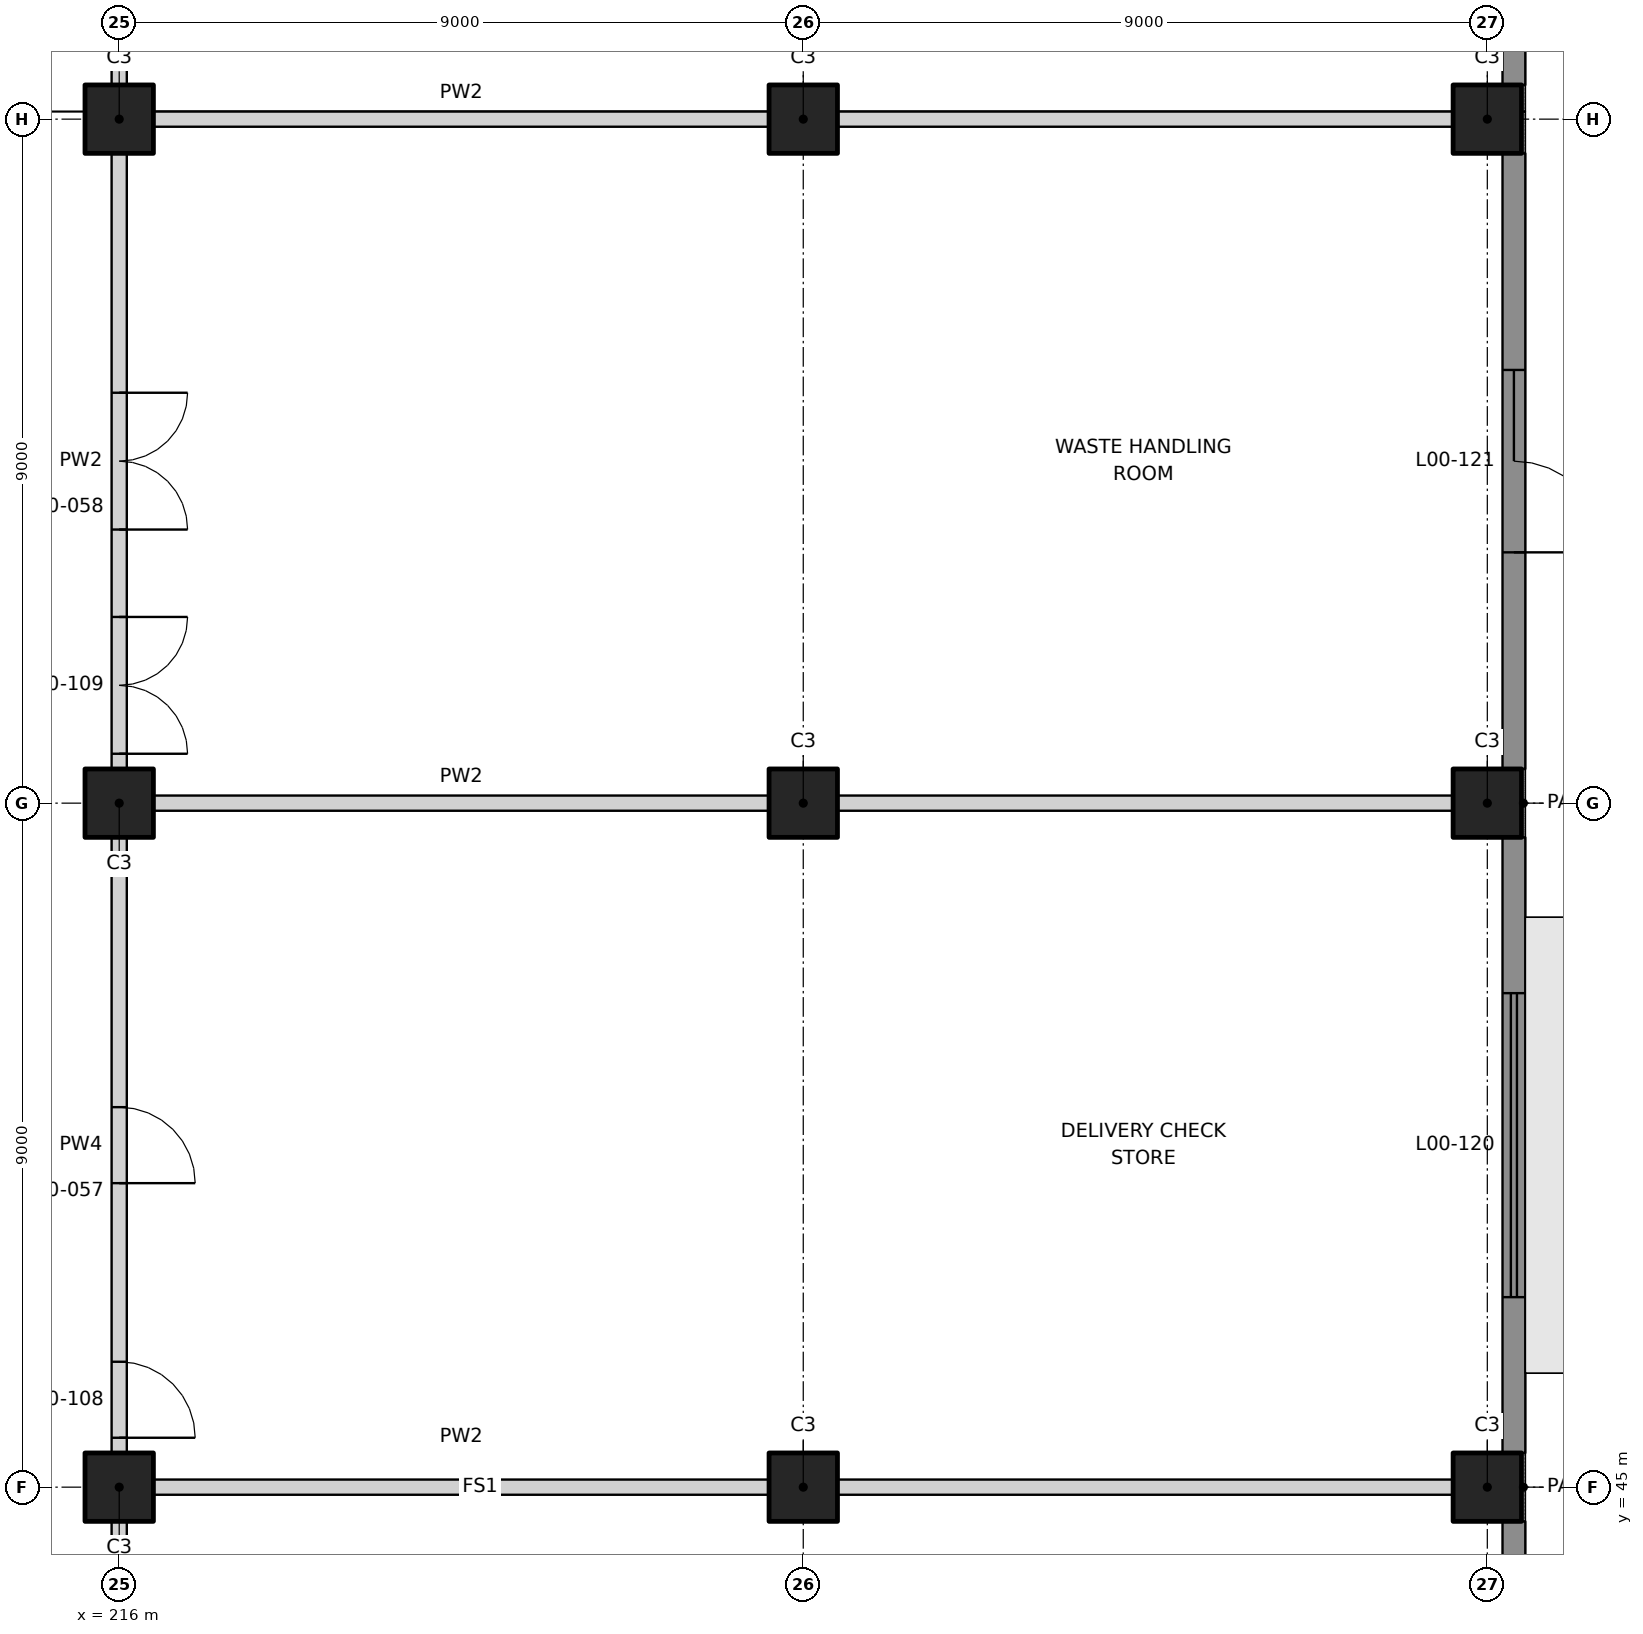
"""IFC4 building model, lengths in metres.
Left out: names, types, materials, properties, quantities, classifications, styles, units other than length and angle.
Written with IfcOpenShell. Run it as: python <this file> out.ifc"""

import sys

from ifc_helpers import new_model, si_unit, direction, frame, frame_2d, origin, origin_2d, place, context, subcontext, project, spatial, rectangle, extrude, element, fill, save


model = new_model("IFC4")
c1 = context("Model", 3, precision=1e-05, world=origin(), true_north=direction((0.0, 1.0)))
c2 = subcontext(c1, "Body", "Model", "MODEL_VIEW")
j1 = project(units=[si_unit("LENGTHUNIT", "METRE"), si_unit("PLANEANGLEUNIT", "RADIAN")], contexts=[c1])
p1 = place(None, origin())
s1 = spatial("IfcSite", under=j1, at=p1, CompositionType="ELEMENT")
p2 = place(p1, origin())
s2 = spatial("IfcBuilding", under=s1, at=p2, CompositionType="ELEMENT")
p3 = place(p2, origin())
s3 = spatial("IfcBuildingStorey", under=s2, at=p3, CompositionType="ELEMENT", Elevation=0.0)
for number, where, z_axis, x_axis in (
    (1, (216.0, 45.0, 0.0), (0.0, 0.0, 1.0), (1.0, 0.0, 0.0)),
    (2, (216.0, 54.0, 0.0), (0.0, 0.0, 1.0), (1.0, 0.0, 0.0)),
    (3, (216.0, 63.0, 0.0), (0.0, 0.0, 1.0), (1.0, 0.0, 0.0)),
    (4, (225.0, 45.0, 0.0), (0.0, 0.0, 1.0), (1.0, 0.0, 0.0)),
    (5, (225.0, 54.0, 0.0), (0.0, 0.0, 1.0), (1.0, 0.0, 0.0)),
    (6, (225.0, 63.0, 0.0), (0.0, 0.0, 1.0), (1.0, 0.0, 0.0)),
    (7, (234.0, 45.0, 0.0), (0.0, 0.0, 1.0), (1.0, 0.0, 0.0)),
    (8, (234.0, 54.0, 0.0), (0.0, 0.0, 1.0), (1.0, 0.0, 0.0)),
    (9, (234.0, 63.0, 0.0), (0.0, 0.0, 1.0), (1.0, 0.0, 0.0)),
):
    element("IfcColumn", number, at=place(p3, frame(where, z_axis=z_axis, x_axis=x_axis)), inside=s3, PredefinedType="COLUMN", context=c2, shape_type="SweptSolid", body=[
        extrude(rectangle(XDim=0.9, YDim=0.9, at=origin_2d()), origin(), (0.0, 0.0, 1.0), 7.0),
    ])
for number, where, z_axis, x_axis in (
    (10, (225.45, 45.0, 0.0), (0.0, 0.0, 1.0), (1.0, 0.0, 0.0)),
    (11, (216.45, 45.0, 0.0), (0.0, 0.0, 1.0), (1.0, 0.0, 0.0)),
    (12, (225.45, 54.0, 0.0), (0.0, 0.0, 1.0), (1.0, 0.0, 0.0)),
    (13, (216.45, 54.0, 0.0), (0.0, 0.0, 1.0), (1.0, 0.0, 0.0)),
    (14, (225.45, 63.0, 0.0), (0.0, 0.0, 1.0), (1.0, 0.0, 0.0)),
    (15, (216.45, 63.0, 0.0), (0.0, 0.0, 1.0), (1.0, 0.0, 0.0)),
    (16, (216.0, 36.45, 0.0), (0.0, 0.0, 1.0), (0.0, 1.0, 0.0)),
):
    element("IfcWall", number, at=place(p3, frame(where, z_axis=z_axis, x_axis=x_axis)), inside=s3, PredefinedType="PARTITIONING", context=c2, shape_type="SweptSolid", body=[
        extrude(rectangle(XDim=8.1, YDim=0.2, at=frame_2d((4.05, 0.0))), origin(), (0.0, 0.0, 1.0), 5.75),
    ])
p4 = place(p3, frame((216.0, 45.45, 0.0), z_axis=(0.0, 0.0, 1.0), x_axis=(0.0, 1.0, 0.0)))
e17 = element("IfcWall", 17, at=p4, inside=s3, PredefinedType="PARTITIONING", context=c2, shape_type="SweptSolid", body=[
    extrude(rectangle(XDim=8.1, YDim=0.2, at=frame_2d((4.05, 0.0))), origin(), (0.0, 0.0, 1.0), 5.75),
])
p5 = place(p4, frame((3.55, 0.0, 0.0)))
e18 = element("IfcOpeningElement", 18, at=p5, cuts=e17, PredefinedType="OPENING", context=c2, shape_type="SweptSolid", body=[
    extrude(rectangle(XDim=1.0, YDim=2.1, at=frame_2d((0.5, 1.05))), frame((0.0, 0.11, 0.0), z_axis=(0.0, -1.0, 0.0), x_axis=(1.0, 0.0, 0.0)), (0.0, 0.0, 1.0), 0.22),
])
p6 = place(p4, frame((0.2, 0.0, 0.0)))
e19 = element("IfcOpeningElement", 19, at=p6, cuts=e17, PredefinedType="OPENING", context=c2, shape_type="SweptSolid", body=[
    extrude(rectangle(XDim=1.0, YDim=2.1, at=frame_2d((0.5, 1.05))), frame((0.0, 0.11, 0.0), z_axis=(0.0, -1.0, 0.0), x_axis=(1.0, 0.0, 0.0)), (0.0, 0.0, 1.0), 0.22),
])
p7 = place(p3, frame((216.0, 54.45, 0.0), z_axis=(0.0, 0.0, 1.0), x_axis=(0.0, 1.0, 0.0)))
e20 = element("IfcWall", 20, at=p7, inside=s3, PredefinedType="PARTITIONING", context=c2, shape_type="SweptSolid", body=[
    extrude(rectangle(XDim=8.1, YDim=0.2, at=frame_2d((4.05, 0.0))), origin(), (0.0, 0.0, 1.0), 5.75),
])
p8 = place(p7, frame((3.15, 0.0, 0.0)))
e21 = element("IfcOpeningElement", 21, at=p8, cuts=e20, PredefinedType="OPENING", context=c2, shape_type="SweptSolid", body=[
    extrude(rectangle(XDim=1.8, YDim=2.1, at=frame_2d((0.9, 1.05))), frame((0.0, 0.11, 0.0), z_axis=(0.0, -1.0, 0.0), x_axis=(1.0, 0.0, 0.0)), (0.0, 0.0, 1.0), 0.22),
])
p9 = place(p7, frame((0.2, 0.0, 0.0)))
e22 = element("IfcOpeningElement", 22, at=p9, cuts=e20, PredefinedType="OPENING", context=c2, shape_type="SweptSolid", body=[
    extrude(rectangle(XDim=1.8, YDim=2.1, at=frame_2d((0.9, 1.05))), frame((0.0, 0.11, 0.0), z_axis=(0.0, -1.0, 0.0), x_axis=(1.0, 0.0, 0.0)), (0.0, 0.0, 1.0), 0.22),
])
p10 = place(p3, frame((216.0, 63.45, 0.0), z_axis=(0.0, 0.0, 1.0), x_axis=(0.0, 1.0, 0.0)))
e23 = element("IfcWall", 23, at=p10, inside=s3, PredefinedType="PARTITIONING", context=c2, shape_type="SweptSolid", body=[
    extrude(rectangle(XDim=2.45, YDim=0.2, at=frame_2d((1.225, 0.0))), origin(), (0.0, 0.0, 1.0), 5.65),
])
p11 = place(p3, frame((234.35, 36.0, 0.0), z_axis=(0.0, 0.0, 1.0), x_axis=(0.0, 1.0, 0.0)))
e24 = element("IfcWall", 24, at=p11, inside=s3, PredefinedType="SOLIDWALL", context=c2, shape_type="SweptSolid", body=[
    extrude(rectangle(XDim=8.55, YDim=0.3, at=frame_2d((4.275, 0.0))), origin(), (0.0, 0.0, 1.0), 7.0),
])
p12 = place(p11, frame((3.3, 0.0, 0.0)))
e25 = element("IfcOpeningElement", 25, at=p12, cuts=e24, PredefinedType="OPENING", context=c2, shape_type="SweptSolid", body=[
    extrude(rectangle(XDim=2.4, YDim=2.4, at=frame_2d((1.2, 1.2))), frame((0.0, 0.16, 0.0), z_axis=(0.0, -1.0, 0.0), x_axis=(1.0, 0.0, 0.0)), (0.0, 0.0, 1.0), 0.32),
])
p13 = place(p3, frame((234.35, 45.45, 0.0), z_axis=(0.0, 0.0, 1.0), x_axis=(0.0, 1.0, 0.0)))
e26 = element("IfcWall", 26, at=p13, inside=s3, PredefinedType="SOLIDWALL", context=c2, shape_type="SweptSolid", body=[
    extrude(rectangle(XDim=8.1, YDim=0.3, at=frame_2d((4.05, 0.0))), origin(), (0.0, 0.0, 1.0), 7.0),
])
p14 = place(p13, frame((2.05, 0.0, 0.0)))
e27 = element("IfcOpeningElement", 27, at=p14, cuts=e26, PredefinedType="OPENING", context=c2, shape_type="SweptSolid", body=[
    extrude(rectangle(XDim=4.0, YDim=4.5, at=frame_2d((2.0, 2.25))), frame((0.0, 0.16, 0.0), z_axis=(0.0, -1.0, 0.0), x_axis=(1.0, 0.0, 0.0)), (0.0, 0.0, 1.0), 0.32),
])
p15 = place(p3, frame((234.35, 54.45, 0.0), z_axis=(0.0, 0.0, 1.0), x_axis=(0.0, 1.0, 0.0)))
e28 = element("IfcWall", 28, at=p15, inside=s3, PredefinedType="SOLIDWALL", context=c2, shape_type="SweptSolid", body=[
    extrude(rectangle(XDim=8.1, YDim=0.3, at=frame_2d((4.05, 0.0))), origin(), (0.0, 0.0, 1.0), 7.0),
])
p16 = place(p15, frame((2.85, 0.0, 0.0)))
e29 = element("IfcOpeningElement", 29, at=p16, cuts=e28, PredefinedType="OPENING", context=c2, shape_type="SweptSolid", body=[
    extrude(rectangle(XDim=2.4, YDim=2.4, at=frame_2d((1.2, 1.2))), frame((0.0, 0.16, 0.0), z_axis=(0.0, -1.0, 0.0), x_axis=(1.0, 0.0, 0.0)), (0.0, 0.0, 1.0), 0.32),
])
p17 = place(p3, frame((234.35, 63.45, 0.0), z_axis=(0.0, 0.0, 1.0), x_axis=(0.0, 1.0, 0.0)))
e30 = element("IfcWall", 30, at=p17, inside=s3, PredefinedType="SOLIDWALL", context=c2, shape_type="SweptSolid", body=[
    extrude(rectangle(XDim=8.1, YDim=0.3, at=frame_2d((4.05, 0.0))), origin(), (0.0, 0.0, 1.0), 7.0),
])
p18 = place(p17, frame((2.05, 0.0, 0.0)))
e31 = element("IfcOpeningElement", 31, at=p18, cuts=e30, PredefinedType="OPENING", context=c2, shape_type="SweptSolid", body=[
    extrude(rectangle(XDim=4.0, YDim=4.5, at=frame_2d((2.0, 2.25))), frame((0.0, 0.16, 0.0), z_axis=(0.0, -1.0, 0.0), x_axis=(1.0, 0.0, 0.0)), (0.0, 0.0, 1.0), 0.32),
])
p19 = place(p5, frame((1.0, 0.0, 0.0), z_axis=(0.0, 0.0, 1.0), x_axis=(-1.0, 0.0, 0.0)))
e32 = element("IfcDoor", 32, at=p19, inside=s3, OperationType="SINGLE_SWING_RIGHT", PredefinedType="DOOR", context=c2, shape_type="SweptSolid", body=[
    extrude(rectangle(XDim=1.0, YDim=2.1, at=frame_2d((0.5, 1.05))), frame((0.0, 0.025, 0.0), z_axis=(0.0, -1.0, 0.0), x_axis=(1.0, 0.0, 0.0)), (0.0, 0.0, 1.0), 0.05),
])
fill(e18, e32)
p20 = place(p8, frame((1.8, 0.0, 0.0), z_axis=(0.0, 0.0, 1.0), x_axis=(-1.0, 0.0, 0.0)))
e33 = element("IfcDoor", 33, at=p20, inside=s3, OperationType="DOUBLE_DOOR_DOUBLE_SWING", PredefinedType="DOOR", context=c2, shape_type="SweptSolid", body=[
    extrude(rectangle(XDim=1.8, YDim=2.1, at=frame_2d((0.9, 1.05))), frame((0.0, 0.025, 0.0), z_axis=(0.0, -1.0, 0.0), x_axis=(1.0, 0.0, 0.0)), (0.0, 0.0, 1.0), 0.05),
])
fill(e21, e33)
p21 = place(p6, frame((1.0, 0.0, 0.0), z_axis=(0.0, 0.0, 1.0), x_axis=(-1.0, 0.0, 0.0)))
e34 = element("IfcDoor", 34, at=p21, inside=s3, OperationType="SINGLE_SWING_RIGHT", PredefinedType="DOOR", context=c2, shape_type="SweptSolid", body=[
    extrude(rectangle(XDim=1.0, YDim=2.1, at=frame_2d((0.5, 1.05))), frame((0.0, 0.025, 0.0), z_axis=(0.0, -1.0, 0.0), x_axis=(1.0, 0.0, 0.0)), (0.0, 0.0, 1.0), 0.05),
])
fill(e19, e34)
p22 = place(p9, frame((1.8, 0.0, 0.0), z_axis=(0.0, 0.0, 1.0), x_axis=(-1.0, 0.0, 0.0)))
e35 = element("IfcDoor", 35, at=p22, inside=s3, OperationType="DOUBLE_DOOR_DOUBLE_SWING", PredefinedType="DOOR", context=c2, shape_type="SweptSolid", body=[
    extrude(rectangle(XDim=1.8, YDim=2.1, at=frame_2d((0.9, 1.05))), frame((0.0, 0.025, 0.0), z_axis=(0.0, -1.0, 0.0), x_axis=(1.0, 0.0, 0.0)), (0.0, 0.0, 1.0), 0.05),
])
fill(e22, e35)
p23 = place(p14, origin())
e36 = element("IfcDoor", 36, at=p23, inside=s3, OperationType="ROLLINGUP", PredefinedType="DOOR", context=c2, shape_type="SweptSolid", body=[
    extrude(rectangle(XDim=4.0, YDim=4.5, at=frame_2d((2.0, 2.25))), frame((0.0, 0.025, 0.0), z_axis=(0.0, -1.0, 0.0), x_axis=(1.0, 0.0, 0.0)), (0.0, 0.0, 1.0), 0.05),
])
fill(e27, e36)
p24 = place(p16, frame((2.4, 0.0, 0.0), z_axis=(0.0, 0.0, 1.0), x_axis=(-1.0, 0.0, 0.0)))
e37 = element("IfcDoor", 37, at=p24, inside=s3, OperationType="DOUBLE_DOOR_SINGLE_SWING", PredefinedType="DOOR", context=c2, shape_type="SweptSolid", body=[
    extrude(rectangle(XDim=2.4, YDim=2.4, at=frame_2d((1.2, 1.2))), frame((0.0, 0.025, 0.0), z_axis=(0.0, -1.0, 0.0), x_axis=(1.0, 0.0, 0.0)), (0.0, 0.0, 1.0), 0.05),
])
fill(e29, e37)
save(model, sys.argv[1])
